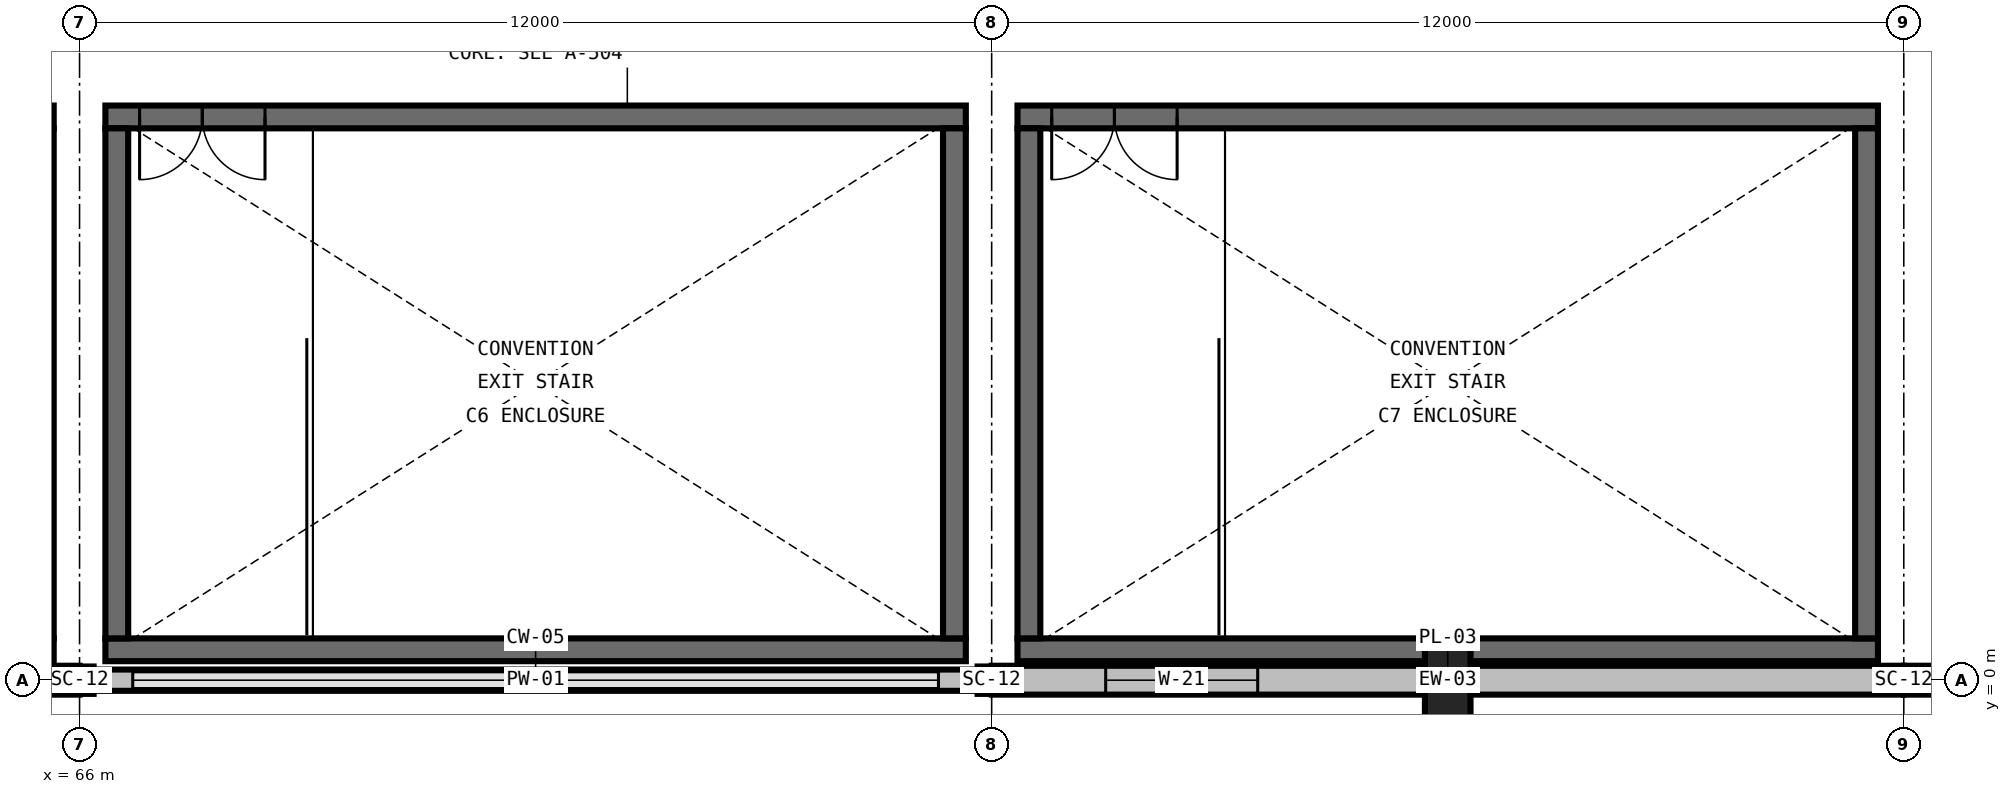
"""IFC4 building model, lengths in metres.
Left out: names, types, materials, properties, quantities, classifications, styles, units other than length and angle.
Written with IfcOpenShell. Run it as: python <this file> out.ifc"""

import sys

from ifc_helpers import new_model, si_unit, direction, frame, frame_2d, origin, origin_2d, place, context, subcontext, project, spatial, rectangle, i_section, extrude, element, fill, save


model = new_model("IFC4")
c1 = context("Model", 3, precision=1e-05, world=origin(), true_north=direction((0.0, 1.0)))
c2 = subcontext(c1, "Body", "Model", "MODEL_VIEW")
j1 = project(units=[si_unit("LENGTHUNIT", "METRE"), si_unit("PLANEANGLEUNIT", "RADIAN")], contexts=[c1])
p1 = place(None, origin())
s1 = spatial("IfcSite", under=j1, at=p1, CompositionType="ELEMENT")
p2 = place(p1, origin())
s2 = spatial("IfcBuilding", under=s1, at=p2, CompositionType="ELEMENT")
p3 = place(p2, frame((0.0, 0.0, 23.4)))
s3 = spatial("IfcBuildingStorey", under=s2, at=p3, CompositionType="ELEMENT", Elevation=23.4)
for number, where, z_axis, x_axis in (
    (1, (66.0, 0.0, 0.0), (0.0, 0.0, 1.0), (1.0, 0.0, 0.0)),
    (2, (78.0, 0.0, 0.0), (0.0, 0.0, 1.0), (1.0, 0.0, 0.0)),
    (3, (90.0, 0.0, 0.0), (0.0, 0.0, 1.0), (1.0, 0.0, 0.0)),
):
    element("IfcColumn", number, at=place(p3, frame(where, z_axis=z_axis, x_axis=x_axis)), inside=s3, PredefinedType="COLUMN", context=c2, shape_type="SweptSolid", body=[
        extrude(i_section(OverallWidth=0.37, OverallDepth=0.36, WebThickness=0.012, FlangeThickness=0.02, FilletRadius=0.031, at=origin_2d()), origin(), (0.0, 0.0, 1.0), 3.85),
    ])
p4 = place(p3, frame((84.0, 0.0, 0.0), z_axis=(0.0, 0.0, 1.0), x_axis=(1.0, 0.0, 0.0)))
e4 = element("IfcColumn", 4, at=p4, inside=s3, PredefinedType="PILASTER", context=c2, shape_type="SweptSolid", body=[
    extrude(rectangle(XDim=0.6, YDim=1.0, at=origin_2d()), origin(), (0.0, 0.0, 1.0), 3.85),
])
p5 = place(p3, frame((65.66, 0.4, 0.0), z_axis=(0.0, 0.0, 1.0), x_axis=(-1.0, 0.0, 0.0)))
e5 = element("IfcWall", 5, at=p5, inside=s3, PredefinedType="SHEAR", context=c2, shape_type="SweptSolid", body=[
    extrude(rectangle(XDim=11.32, YDim=0.3, at=frame_2d((5.66, 0.0))), origin(), (0.0, 0.0, 1.0), 3.85),
])
p6 = place(p3, frame((65.66, 7.41, 0.0), z_axis=(0.0, 0.0, 1.0), x_axis=(-1.0, 0.0, 0.0)))
e6 = element("IfcWall", 6, at=p6, inside=s3, PredefinedType="SHEAR", context=c2, shape_type="SweptSolid", body=[
    extrude(rectangle(XDim=11.32, YDim=0.3, at=frame_2d((5.66, 0.0))), origin(), (0.0, 0.0, 1.0), 3.85),
])
p7 = place(p6, frame((9.22, 0.0, 0.0)))
e7 = element("IfcOpeningElement", 7, at=p7, cuts=e6, PredefinedType="OPENING", context=c2, shape_type="SweptSolid", body=[
    extrude(rectangle(XDim=1.65, YDim=2.25, at=frame_2d((0.825, 1.125))), frame((0.0, 0.165, 0.0), z_axis=(0.0, -1.0, 0.0), x_axis=(1.0, 0.0, 0.0)), (0.0, 0.0, 1.0), 0.33),
])
p8 = place(p3, frame((65.51, 0.55, 0.0), z_axis=(0.0, 0.0, 1.0), x_axis=(0.0, 1.0, 0.0)))
e8 = element("IfcWall", 8, at=p8, inside=s3, PredefinedType="SHEAR", context=c2, shape_type="SweptSolid", body=[
    extrude(rectangle(XDim=6.71, YDim=0.3, at=frame_2d((3.355, 0.0))), origin(), (0.0, 0.0, 1.0), 3.85),
])
p9 = place(p3, frame((77.66, 0.4, 0.0), z_axis=(0.0, 0.0, 1.0), x_axis=(-1.0, 0.0, 0.0)))
e9 = element("IfcWall", 9, at=p9, inside=s3, PredefinedType="SHEAR", context=c2, shape_type="SweptSolid", body=[
    extrude(rectangle(XDim=11.32, YDim=0.3, at=frame_2d((5.66, 0.0))), origin(), (0.0, 0.0, 1.0), 3.85),
])
p10 = place(p3, frame((77.66, 7.41, 0.0), z_axis=(0.0, 0.0, 1.0), x_axis=(-1.0, 0.0, 0.0)))
e10 = element("IfcWall", 10, at=p10, inside=s3, PredefinedType="SHEAR", context=c2, shape_type="SweptSolid", body=[
    extrude(rectangle(XDim=11.32, YDim=0.3, at=frame_2d((5.66, 0.0))), origin(), (0.0, 0.0, 1.0), 3.85),
])
p11 = place(p10, frame((9.22, 0.0, 0.0)))
e11 = element("IfcOpeningElement", 11, at=p11, cuts=e10, PredefinedType="OPENING", context=c2, shape_type="SweptSolid", body=[
    extrude(rectangle(XDim=1.65, YDim=2.25, at=frame_2d((0.825, 1.125))), frame((0.0, 0.165, 0.0), z_axis=(0.0, -1.0, 0.0), x_axis=(1.0, 0.0, 0.0)), (0.0, 0.0, 1.0), 0.33),
])
for number, where, z_axis, x_axis in (
    (12, (66.49, 7.26, 0.0), (0.0, 0.0, 1.0), (0.0, -1.0, 0.0)),
    (13, (77.51, 0.55, 0.0), (0.0, 0.0, 1.0), (0.0, 1.0, 0.0)),
):
    element("IfcWall", number, at=place(p3, frame(where, z_axis=z_axis, x_axis=x_axis)), inside=s3, PredefinedType="SHEAR", context=c2, shape_type="SweptSolid", body=[
        extrude(rectangle(XDim=6.71, YDim=0.3, at=frame_2d((3.355, 0.0))), origin(), (0.0, 0.0, 1.0), 3.85),
    ])
p12 = place(p3, frame((89.66, 0.4, 0.0), z_axis=(0.0, 0.0, 1.0), x_axis=(-1.0, 0.0, 0.0)))
e14 = element("IfcWall", 14, at=p12, inside=s3, PredefinedType="SHEAR", context=c2, shape_type="SweptSolid", body=[
    extrude(rectangle(XDim=11.32, YDim=0.3, at=frame_2d((5.66, 0.0))), origin(), (0.0, 0.0, 1.0), 3.85),
])
p13 = place(p3, frame((89.66, 7.41, 0.0), z_axis=(0.0, 0.0, 1.0), x_axis=(-1.0, 0.0, 0.0)))
e15 = element("IfcWall", 15, at=p13, inside=s3, PredefinedType="SHEAR", context=c2, shape_type="SweptSolid", body=[
    extrude(rectangle(XDim=11.32, YDim=0.3, at=frame_2d((5.66, 0.0))), origin(), (0.0, 0.0, 1.0), 3.85),
])
p14 = place(p13, frame((9.22, 0.0, 0.0)))
e16 = element("IfcOpeningElement", 16, at=p14, cuts=e15, PredefinedType="OPENING", context=c2, shape_type="SweptSolid", body=[
    extrude(rectangle(XDim=1.65, YDim=2.25, at=frame_2d((0.825, 1.125))), frame((0.0, 0.165, 0.0), z_axis=(0.0, -1.0, 0.0), x_axis=(1.0, 0.0, 0.0)), (0.0, 0.0, 1.0), 0.33),
])
for number, where, z_axis, x_axis in (
    (17, (78.49, 7.26, 0.0), (0.0, 0.0, 1.0), (0.0, -1.0, 0.0)),
    (18, (89.51, 0.55, 0.0), (0.0, 0.0, 1.0), (0.0, 1.0, 0.0)),
):
    element("IfcWall", number, at=place(p3, frame(where, z_axis=z_axis, x_axis=x_axis)), inside=s3, PredefinedType="SHEAR", context=c2, shape_type="SweptSolid", body=[
        extrude(rectangle(XDim=6.71, YDim=0.3, at=frame_2d((3.355, 0.0))), origin(), (0.0, 0.0, 1.0), 3.85),
    ])
p15 = place(p3, frame((54.0, 0.0, 0.0), z_axis=(0.0, 0.0, 1.0), x_axis=(1.0, 0.0, 0.0)))
e19 = element("IfcWall", 19, at=p15, inside=s3, PredefinedType="STANDARD", context=c2, shape_type="SweptSolid", body=[
    extrude(rectangle(XDim=12.0, YDim=0.38, at=frame_2d((6.0, 0.0))), origin(), (0.0, 0.0, 1.0), 2.626),
])
p16 = place(p15, frame((1.5, 0.0, 0.85)))
e20 = element("IfcOpeningElement", 20, at=p16, cuts=e19, PredefinedType="OPENING", context=c2, shape_type="SweptSolid", body=[
    extrude(rectangle(XDim=2.0, YDim=1.56, at=frame_2d((1.0, 0.78))), frame((0.0, 0.205, 0.0), z_axis=(0.0, -1.0, 0.0), x_axis=(1.0, 0.0, 0.0)), (0.0, 0.0, 1.0), 0.41),
])
p17 = place(p3, frame((66.0, 0.0, 0.0), z_axis=(0.0, 0.0, 1.0), x_axis=(1.0, 0.0, 0.0)))
e21 = element("IfcWall", 21, at=p17, inside=s3, PredefinedType="PARAPET", context=c2, shape_type="SweptSolid", body=[
    extrude(rectangle(XDim=12.0, YDim=0.28, at=frame_2d((6.0, 0.0))), origin(), (0.0, 0.0, 1.0), 0.2),
])
p18 = place(p3, frame((78.0, 0.0, 0.0), z_axis=(0.0, 0.0, 1.0), x_axis=(1.0, 0.0, 0.0)))
e22 = element("IfcWall", 22, at=p18, inside=s3, PredefinedType="STANDARD", context=c2, shape_type="SweptSolid", body=[
    extrude(rectangle(XDim=12.0, YDim=0.38, at=frame_2d((6.0, 0.0))), origin(), (0.0, 0.0, 1.0), 2.626),
])
p19 = place(p18, frame((1.5, 0.0, 0.85)))
e23 = element("IfcOpeningElement", 23, at=p19, cuts=e22, PredefinedType="OPENING", context=c2, shape_type="SweptSolid", body=[
    extrude(rectangle(XDim=2.0, YDim=1.56, at=frame_2d((1.0, 0.78))), frame((0.0, 0.205, 0.0), z_axis=(0.0, -1.0, 0.0), x_axis=(1.0, 0.0, 0.0)), (0.0, 0.0, 1.0), 0.41),
])
p20 = place(p3, frame((90.0, 0.0, 0.0), z_axis=(0.0, 0.0, 1.0), x_axis=(1.0, 0.0, 0.0)))
e24 = element("IfcWall", 24, at=p20, inside=s3, PredefinedType="STANDARD", context=c2, shape_type="SweptSolid", body=[
    extrude(rectangle(XDim=6.0, YDim=0.38, at=frame_2d((3.0, 0.0))), origin(), (0.0, 0.0, 1.0), 2.626),
])
p21 = place(p3, frame((0.0, 0.14, 3.85), z_axis=(0.0, 0.0, 1.0), x_axis=(1.0, 0.0, 0.0)))
e25 = element("IfcWall", 25, at=p21, inside=s3, PredefinedType="PARAPET", context=c2, shape_type="SweptSolid", body=[
    extrude(rectangle(XDim=174.0, YDim=0.28, at=frame_2d((87.0, 0.0))), origin(), (0.0, 0.0, 1.0), 1.2),
])
p22 = place(p11, origin())
e26 = element("IfcDoor", 26, at=p22, inside=s3, OperationType="DOUBLE_DOOR_SINGLE_SWING", PredefinedType="DOOR", context=c2, shape_type="SweptSolid", body=[
    extrude(rectangle(XDim=1.65, YDim=2.25, at=frame_2d((0.825, 1.125))), frame((0.0, 0.025, 0.0), z_axis=(0.0, -1.0, 0.0), x_axis=(1.0, 0.0, 0.0)), (0.0, 0.0, 1.0), 0.05),
])
fill(e11, e26)
p23 = place(p14, origin())
e27 = element("IfcDoor", 27, at=p23, inside=s3, OperationType="DOUBLE_DOOR_SINGLE_SWING", PredefinedType="DOOR", context=c2, shape_type="SweptSolid", body=[
    extrude(rectangle(XDim=1.65, YDim=2.25, at=frame_2d((0.825, 1.125))), frame((0.0, 0.025, 0.0), z_axis=(0.0, -1.0, 0.0), x_axis=(1.0, 0.0, 0.0)), (0.0, 0.0, 1.0), 0.05),
])
fill(e16, e27)
p24 = place(p19, origin())
e28 = element("IfcWindow", 28, at=p24, inside=s3, PartitioningType="DOUBLE_PANEL_VERTICAL", PredefinedType="WINDOW", context=c2, shape_type="SweptSolid", body=[
    extrude(rectangle(XDim=2.0, YDim=1.56, at=frame_2d((1.0, 0.78))), frame((0.0, 0.03, 0.0), z_axis=(0.0, -1.0, 0.0), x_axis=(1.0, 0.0, 0.0)), (0.0, 0.0, 1.0), 0.06),
])
fill(e23, e28)
save(model, sys.argv[1])
